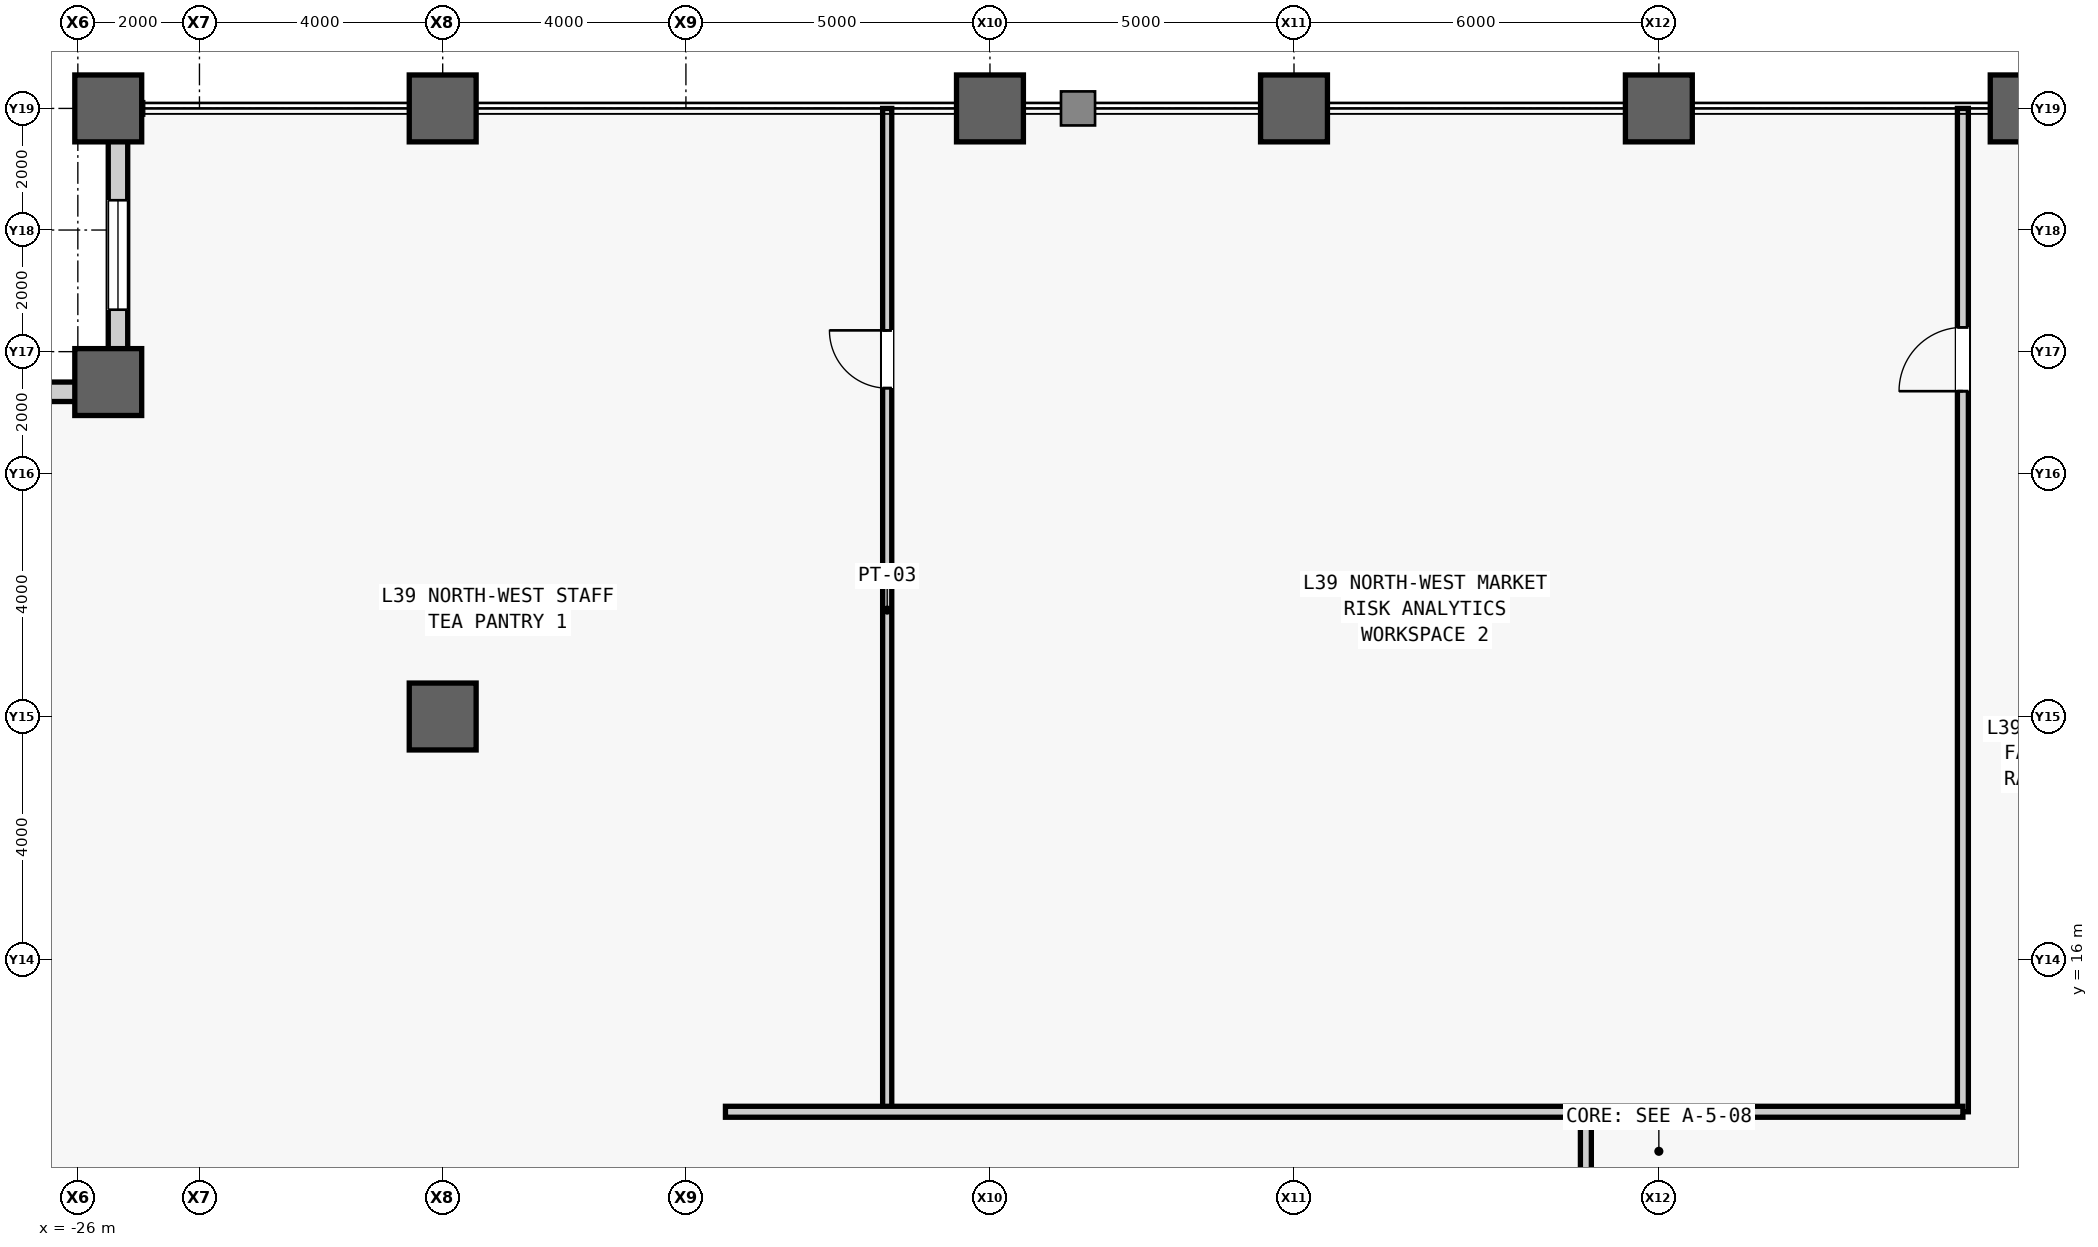
"""IFC4 building model, lengths in metres.
Left out: names, types, materials, properties, quantities, classifications, styles, units other than length and angle.
Written with IfcOpenShell. Run it as: python <this file> out.ifc"""

import sys

from ifc_helpers import new_model, si_unit, direction, frame, frame_2d, origin, origin_2d, place, context, subcontext, project, spatial, rectangle, hollow_rectangle, extrude, source, transform, mapped, element, fill, save


model = new_model("IFC4")
c1 = context("Model", 3, precision=1e-05, world=origin(), true_north=direction((0.0, 1.0)))
c2 = subcontext(c1, "Body", "Model", "MODEL_VIEW")
j1 = project(units=[si_unit("LENGTHUNIT", "METRE"), si_unit("PLANEANGLEUNIT", "RADIAN")], contexts=[c1])
p1 = place(None, origin())
s1 = spatial("IfcSite", under=j1, at=p1, CompositionType="ELEMENT")
p2 = place(p1, origin())
s2 = spatial("IfcBuilding", under=s1, at=p2, CompositionType="ELEMENT")
p3 = place(p2, frame((0.0, 0.0, 171.1)))
s3 = spatial("IfcBuildingStorey", under=s2, at=p3, CompositionType="ELEMENT", Elevation=171.1)
m1 = source(origin(), c2, "Body", "SweptSolid", [
    extrude(hollow_rectangle(XDim=1.1, YDim=1.1, WallThickness=0.06, at=origin_2d()), origin(), (0.0, 0.0, 1.0), 4.0),
])
for number, where, z_axis, x_axis in (
    (1, (-25.5, 25.5, 0.0), (0.0, 0.0, 1.0), (1.0, 0.0, 0.0)),
    (2, (-25.5, 30.0, 0.0), (0.0, 0.0, 1.0), (1.0, 0.0, 0.0)),
    (3, (-20.0, 20.0, 0.0), (0.0, 0.0, 1.0), (1.0, 0.0, 0.0)),
    (4, (-20.0, 30.0, 0.0), (0.0, 0.0, 1.0), (1.0, 0.0, 0.0)),
    (5, (-11.0, 30.0, 0.0), (0.0, 0.0, 1.0), (1.0, 0.0, 0.0)),
    (6, (-6.0, 30.0, 0.0), (0.0, 0.0, 1.0), (1.0, 0.0, 0.0)),
    (7, (0.0, 30.0, 0.0), (0.0, 0.0, 1.0), (1.0, 0.0, 0.0)),
    (8, (6.0, 30.0, 0.0), (0.0, 0.0, 1.0), (1.0, 0.0, 0.0)),
):
    element("IfcColumn", number, at=place(p3, frame(where, z_axis=z_axis, x_axis=x_axis)), inside=s3, PredefinedType="COLUMN", context=c2, shape_type="MappedRepresentation", body=[
        mapped(m1, transform((0.0, 0.0, 0.0), scale=1.0)),
    ])
m2 = source(origin(), c2, "Body", "SweptSolid", [
    extrude(rectangle(XDim=4.18, YDim=0.32, at=frame_2d((2.09, 0.0))), origin(), (0.0, 0.0, 1.0), 3.164),
])
p4 = place(p3, frame((-25.34, 25.5, 0.0), z_axis=(0.0, 0.0, 1.0), x_axis=(0.0, 1.0, 0.0)))
e9 = element("IfcWall", 9, at=p4, inside=s3, PredefinedType="STANDARD", context=c2, shape_type="MappedRepresentation", body=[
    mapped(m2, transform((0.0, 0.0, 0.0), scale=1.0)),
])
m3 = source(origin(), c2, "Body", "SweptSolid", [
    extrude(rectangle(XDim=1.8, YDim=2.4, at=frame_2d((0.9, 1.2))), frame((0.0, 0.17, 0.0), z_axis=(0.0, -1.0, 0.0), x_axis=(1.0, 0.0, 0.0)), (0.0, 0.0, 1.0), 0.34),
])
p5 = place(p4, frame((1.19, 0.0, 0.5)))
e10 = element("IfcOpeningElement", 10, at=p5, cuts=e9, PredefinedType="OPENING", context=c2, shape_type="MappedRepresentation", body=[
    mapped(m3, transform((0.0, 0.0, 0.0), scale=1.0)),
])
p6 = place(p3, frame((-25.5, 25.34, 0.0), z_axis=(0.0, 0.0, 1.0), x_axis=(-1.0, 0.0, 0.0)))
e11 = element("IfcWall", 11, at=p6, inside=s3, PredefinedType="STANDARD", context=c2, shape_type="MappedRepresentation", body=[
    mapped(m2, transform((0.0, 0.0, 0.0), scale=1.0)),
])
p7 = place(p6, frame((1.19, 0.0, 0.5)))
e12 = element("IfcOpeningElement", 12, at=p7, cuts=e11, PredefinedType="OPENING", context=c2, shape_type="MappedRepresentation", body=[
    mapped(m3, transform((0.0, 0.0, 0.0), scale=1.0)),
])
m4 = source(origin(), c2, "Body", "SweptSolid", [
    extrude(rectangle(XDim=2.5, YDim=0.18, at=frame_2d((1.25, 0.0))), origin(), (0.0, 0.0, 1.0), 3.78),
])
p8 = place(p3, frame((-1.2, 11.0, 0.0), z_axis=(0.0, 0.0, 1.0), x_axis=(0.0, 1.0, 0.0)))
e13 = element("IfcWall", 13, at=p8, inside=s3, PredefinedType="PARTITIONING", context=c2, shape_type="MappedRepresentation", body=[
    mapped(m4, transform((0.0, 0.0, 0.0), scale=1.0)),
])
m5 = source(origin(), c2, "Body", "SweptSolid", [
    extrude(rectangle(XDim=16.5, YDim=0.15, at=frame_2d((8.25, 0.0))), origin(), (0.0, 0.0, 1.0), 3.78),
])
p9 = place(p3, frame((-12.69, 13.5, 0.0), z_axis=(0.0, 0.0, 1.0), x_axis=(0.0, 1.0, 0.0)))
e14 = element("IfcWall", 14, at=p9, inside=s3, PredefinedType="PARTITIONING", context=c2, shape_type="MappedRepresentation", body=[
    mapped(m5, transform((0.0, 0.0, 0.0), scale=1.0)),
])
m6 = source(origin(), c2, "Body", "SweptSolid", [
    extrude(rectangle(XDim=0.95, YDim=2.15, at=frame_2d((0.475, 1.075))), frame((0.0, 0.085, 0.0), z_axis=(0.0, -1.0, 0.0), x_axis=(1.0, 0.0, 0.0)), (0.0, 0.0, 1.0), 0.17),
])
p10 = place(p9, frame((11.9, 0.0, 0.0)))
e15 = element("IfcOpeningElement", 15, at=p10, cuts=e14, PredefinedType="OPENING", context=c2, shape_type="MappedRepresentation", body=[
    mapped(m6, transform((0.0, 0.0, 0.0), scale=1.0)),
])
m7 = source(origin(), c2, "Body", "SweptSolid", [
    extrude(rectangle(XDim=16.5, YDim=0.18, at=frame_2d((8.25, 0.0))), origin(), (0.0, 0.0, 1.0), 3.78),
])
p11 = place(p3, frame((5.0, 13.5, 0.0), z_axis=(0.0, 0.0, 1.0), x_axis=(0.0, 1.0, 0.0)))
e16 = element("IfcWall", 16, at=p11, inside=s3, PredefinedType="PARTITIONING", context=c2, shape_type="MappedRepresentation", body=[
    mapped(m7, transform((0.0, 0.0, 0.0), scale=1.0)),
])
m8 = source(origin(), c2, "Body", "SweptSolid", [
    extrude(rectangle(XDim=1.05, YDim=2.2, at=frame_2d((0.525, 1.1))), frame((0.0, 0.1, 0.0), z_axis=(0.0, -1.0, 0.0), x_axis=(1.0, 0.0, 0.0)), (0.0, 0.0, 1.0), 0.2),
])
p12 = place(p11, frame((11.85, 0.0, 0.0)))
e17 = element("IfcOpeningElement", 17, at=p12, cuts=e16, PredefinedType="OPENING", context=c2, shape_type="MappedRepresentation", body=[
    mapped(m8, transform((0.0, 0.0, 0.0), scale=1.0)),
])
m9 = source(origin(), c2, "Body", "SweptSolid", [
    extrude(rectangle(XDim=20.35, YDim=0.18, at=frame_2d((10.175, 0.0))), origin(), (0.0, 0.0, 1.0), 3.78),
])
p13 = place(p3, frame((-15.35, 13.5, 0.0), z_axis=(0.0, 0.0, 1.0), x_axis=(1.0, 0.0, 0.0)))
e18 = element("IfcWall", 18, at=p13, inside=s3, PredefinedType="PARTITIONING", context=c2, shape_type="MappedRepresentation", body=[
    mapped(m9, transform((0.0, 0.0, 0.0), scale=1.0)),
])
m10 = source(origin(), c2, "Body", "SweptSolid", [
    extrude(rectangle(XDim=1.8, YDim=2.4, at=frame_2d((0.9, 1.2))), frame((0.0, 0.03, 0.0), z_axis=(0.0, -1.0, 0.0), x_axis=(1.0, 0.0, 0.0)), (0.0, 0.0, 1.0), 0.06),
])
p14 = place(p5, origin())
e19 = element("IfcWindow", 19, at=p14, inside=s3, PartitioningType="SINGLE_PANEL", PredefinedType="WINDOW", context=c2, shape_type="MappedRepresentation", body=[
    mapped(m10, transform((0.0, 0.0, 0.0), scale=1.0)),
])
fill(e10, e19)
m11 = source(origin(), c2, "Body", "SweptSolid", [
    extrude(rectangle(XDim=0.95, YDim=2.15, at=frame_2d((0.475, 1.075))), frame((0.0, 0.025, 0.0), z_axis=(0.0, -1.0, 0.0), x_axis=(1.0, 0.0, 0.0)), (0.0, 0.0, 1.0), 0.05),
])
p15 = place(p10, origin())
e20 = element("IfcDoor", 20, at=p15, inside=s3, OperationType="SINGLE_SWING_RIGHT", PredefinedType="DOOR", context=c2, shape_type="MappedRepresentation", body=[
    mapped(m11, transform((0.0, 0.0, 0.0), scale=1.0)),
])
fill(e15, e20)
m12 = source(origin(), c2, "Body", "SweptSolid", [
    extrude(rectangle(XDim=1.05, YDim=2.2, at=frame_2d((0.525, 1.1))), frame((0.0, 0.025, 0.0), z_axis=(0.0, -1.0, 0.0), x_axis=(1.0, 0.0, 0.0)), (0.0, 0.0, 1.0), 0.05),
])
p16 = place(p12, origin())
e21 = element("IfcDoor", 21, at=p16, inside=s3, OperationType="SINGLE_SWING_LEFT", PredefinedType="DOOR", context=c2, shape_type="MappedRepresentation", body=[
    mapped(m12, transform((0.0, 0.0, 0.0), scale=1.0)),
])
fill(e17, e21)
save(model, sys.argv[1])
